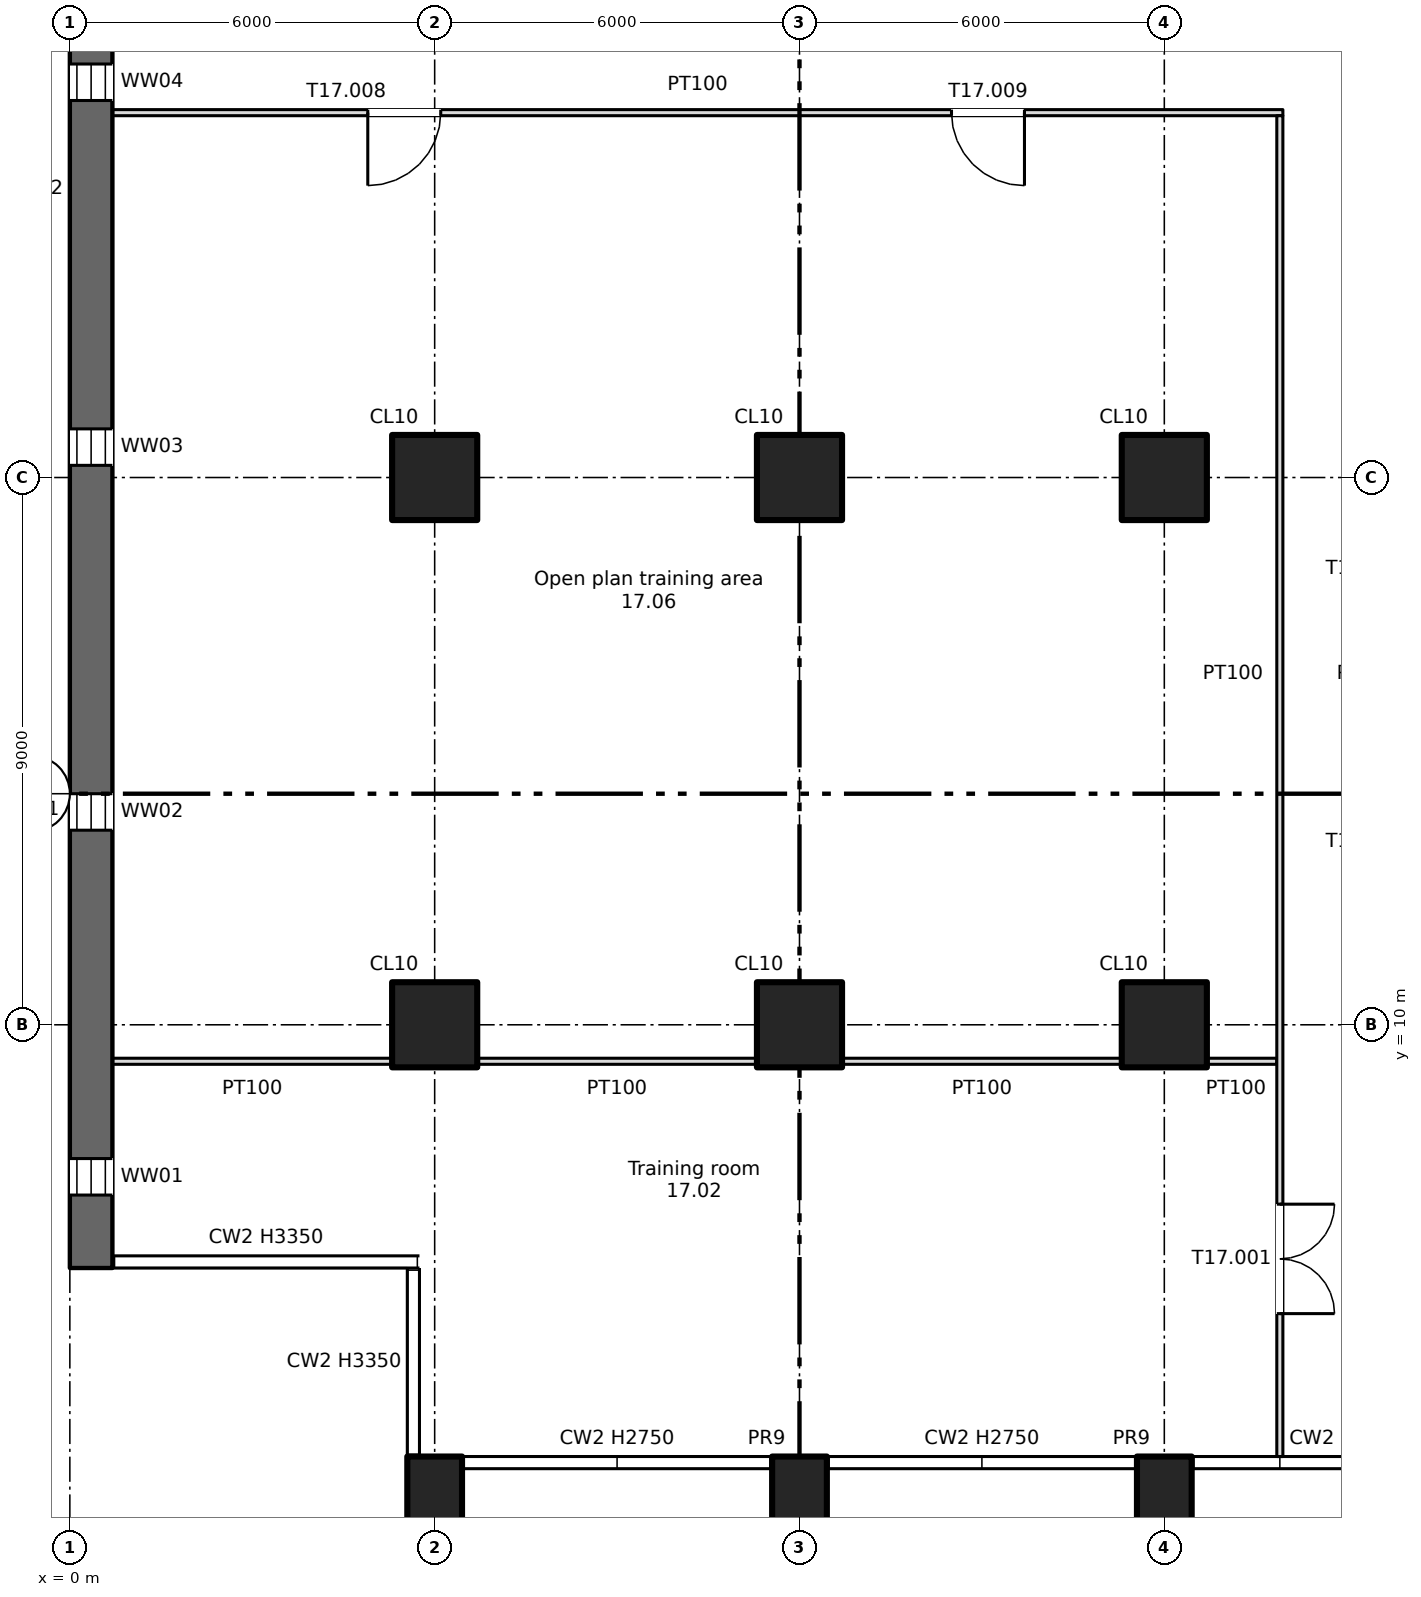
"""IFC4 building model, lengths in metres.
Left out: names, types, materials, properties, quantities, classifications, styles, units other than length and angle.
Written with IfcOpenShell. Run it as: python <this file> out.ifc"""

import sys

from ifc_helpers import new_model, si_unit, direction, frame, frame_2d, origin, origin_2d, place, context, subcontext, project, spatial, rectangle, extrude, element, fill, save


model = new_model("IFC4")
c1 = context("Model", 3, precision=1e-05, world=origin(), true_north=direction((0.0, 1.0)))
c2 = subcontext(c1, "Body", "Model", "MODEL_VIEW")
j1 = project(units=[si_unit("LENGTHUNIT", "METRE"), si_unit("PLANEANGLEUNIT", "RADIAN")], contexts=[c1])
p1 = place(None, origin())
s1 = spatial("IfcSite", under=j1, at=p1, CompositionType="ELEMENT")
p2 = place(p1, origin())
s2 = spatial("IfcBuilding", under=s1, at=p2, CompositionType="ELEMENT")
p3 = place(p2, frame((0.0, 0.0, 106.25)))
s3 = spatial("IfcBuildingStorey", under=s2, at=p3, CompositionType="ELEMENT", Elevation=106.25)
for number, where, z_axis, x_axis in (
    (1, (6.0, 2.2, -0.4), (0.0, 0.0, 1.0), (1.0, 0.0, 0.0)),
    (2, (12.0, 2.2, -0.4), (0.0, 0.0, 1.0), (1.0, 0.0, 0.0)),
    (3, (18.0, 2.2, -0.4), (0.0, 0.0, 1.0), (1.0, 0.0, 0.0)),
):
    element("IfcColumn", number, at=place(p3, frame(where, z_axis=z_axis, x_axis=x_axis)), inside=s3, PredefinedType="COLUMN", context=c2, shape_type="SweptSolid", body=[
        extrude(rectangle(XDim=0.9, YDim=1.4, at=origin_2d()), origin(), (0.0, 0.0, 1.0), 3.75),
    ])
for number, where, z_axis, x_axis in (
    (4, (6.0, 10.0, 0.0), (0.0, 0.0, 1.0), (1.0, 0.0, 0.0)),
    (5, (6.0, 19.0, 0.0), (0.0, 0.0, 1.0), (1.0, 0.0, 0.0)),
    (6, (12.0, 10.0, 0.0), (0.0, 0.0, 1.0), (1.0, 0.0, 0.0)),
    (7, (12.0, 19.0, 0.0), (0.0, 0.0, 1.0), (1.0, 0.0, 0.0)),
    (8, (18.0, 10.0, 0.0), (0.0, 0.0, 1.0), (1.0, 0.0, 0.0)),
    (9, (18.0, 19.0, 0.0), (0.0, 0.0, 1.0), (1.0, 0.0, 0.0)),
):
    element("IfcColumn", number, at=place(p3, frame(where, z_axis=z_axis, x_axis=x_axis)), inside=s3, PredefinedType="COLUMN", context=c2, shape_type="SweptSolid", body=[
        extrude(rectangle(XDim=1.4, YDim=1.4, at=origin_2d()), origin(), (0.0, 0.0, 1.0), 3.35),
    ])
p4 = place(p3, frame((0.35, 6.0, 0.0), z_axis=(0.0, 0.0, 1.0), x_axis=(0.0, 1.0, 0.0)))
e10 = element("IfcWall", 10, at=p4, inside=s3, PredefinedType="SHEAR", context=c2, shape_type="SweptSolid", body=[
    extrude(rectangle(XDim=35.5, YDim=0.7, at=frame_2d((17.75, 0.0))), origin(), (0.0, 0.0, 1.0), 3.35),
])
p5 = place(p4, frame((1.2, 0.0, 0.6)))
e11 = element("IfcOpeningElement", 11, at=p5, cuts=e10, PredefinedType="OPENING", context=c2, shape_type="SweptSolid", body=[
    extrude(rectangle(XDim=0.6, YDim=2.4, at=frame_2d((0.3, 1.2))), frame((0.0, 0.36, 0.0), z_axis=(0.0, -1.0, 0.0), x_axis=(1.0, 0.0, 0.0)), (0.0, 0.0, 1.0), 0.72),
])
p6 = place(p4, frame((7.2, 0.0, 0.6)))
e12 = element("IfcOpeningElement", 12, at=p6, cuts=e10, PredefinedType="OPENING", context=c2, shape_type="SweptSolid", body=[
    extrude(rectangle(XDim=0.6, YDim=2.4, at=frame_2d((0.3, 1.2))), frame((0.0, 0.36, 0.0), z_axis=(0.0, -1.0, 0.0), x_axis=(1.0, 0.0, 0.0)), (0.0, 0.0, 1.0), 0.72),
])
p7 = place(p4, frame((13.2, 0.0, 0.6)))
e13 = element("IfcOpeningElement", 13, at=p7, cuts=e10, PredefinedType="OPENING", context=c2, shape_type="SweptSolid", body=[
    extrude(rectangle(XDim=0.6, YDim=2.4, at=frame_2d((0.3, 1.2))), frame((0.0, 0.36, 0.0), z_axis=(0.0, -1.0, 0.0), x_axis=(1.0, 0.0, 0.0)), (0.0, 0.0, 1.0), 0.72),
])
p8 = place(p4, frame((19.2, 0.0, 0.6)))
e14 = element("IfcOpeningElement", 14, at=p8, cuts=e10, PredefinedType="OPENING", context=c2, shape_type="SweptSolid", body=[
    extrude(rectangle(XDim=0.6, YDim=2.4, at=frame_2d((0.3, 1.2))), frame((0.0, 0.36, 0.0), z_axis=(0.0, -1.0, 0.0), x_axis=(1.0, 0.0, 0.0)), (0.0, 0.0, 1.0), 0.72),
])
p9 = place(p4, frame((25.2, 0.0, 0.6)))
e15 = element("IfcOpeningElement", 15, at=p9, cuts=e10, PredefinedType="OPENING", context=c2, shape_type="SweptSolid", body=[
    extrude(rectangle(XDim=0.6, YDim=2.4, at=frame_2d((0.3, 1.2))), frame((0.0, 0.36, 0.0), z_axis=(0.0, -1.0, 0.0), x_axis=(1.0, 0.0, 0.0)), (0.0, 0.0, 1.0), 0.72),
])
p10 = place(p4, frame((31.2, 0.0, 0.6)))
e16 = element("IfcOpeningElement", 16, at=p10, cuts=e10, PredefinedType="OPENING", context=c2, shape_type="SweptSolid", body=[
    extrude(rectangle(XDim=0.6, YDim=2.4, at=frame_2d((0.3, 1.2))), frame((0.0, 0.36, 0.0), z_axis=(0.0, -1.0, 0.0), x_axis=(1.0, 0.0, 0.0)), (0.0, 0.0, 1.0), 0.72),
])
p11 = place(p3, frame((18.7, 9.4, 0.0), z_axis=(0.0, 0.0, 1.0), x_axis=(1.0, 0.0, 0.0)))
e17 = element("IfcWall", 17, at=p11, inside=s3, PredefinedType="PARTITIONING", context=c2, shape_type="SweptSolid", body=[
    extrude(rectangle(XDim=1.15, YDim=0.1, at=frame_2d((0.575, 0.0))), origin(), (0.0, 0.0, 1.0), 3.35),
])
for number, where, z_axis, x_axis in (
    (18, (12.7, 9.4, 0.0), (0.0, 0.0, 1.0), (1.0, 0.0, 0.0)),
    (19, (6.7, 9.4, 0.0), (0.0, 0.0, 1.0), (1.0, 0.0, 0.0)),
    (20, (0.7, 9.4, 0.0), (0.0, 0.0, 1.0), (1.0, 0.0, 0.0)),
):
    element("IfcWall", number, at=place(p3, frame(where, z_axis=z_axis, x_axis=x_axis)), inside=s3, PredefinedType="PARTITIONING", context=c2, shape_type="SweptSolid", body=[
        extrude(rectangle(XDim=4.6, YDim=0.1, at=frame_2d((2.3, 0.0))), origin(), (0.0, 0.0, 1.0), 3.35),
    ])
p12 = place(p3, frame((0.7, 25.0, 0.0), z_axis=(0.0, 0.0, 1.0), x_axis=(1.0, 0.0, 0.0)))
e21 = element("IfcWall", 21, at=p12, inside=s3, PredefinedType="PARTITIONING", context=c2, shape_type="SweptSolid", body=[
    extrude(rectangle(XDim=19.25, YDim=0.1, at=frame_2d((9.625, 0.0))), origin(), (0.0, 0.0, 1.0), 3.35),
])
p13 = place(p12, frame((4.2, 0.0, 0.0)))
e22 = element("IfcOpeningElement", 22, at=p13, cuts=e21, PredefinedType="OPENING", context=c2, shape_type="SweptSolid", body=[
    extrude(rectangle(XDim=1.2, YDim=2.1, at=frame_2d((0.6, 1.05))), frame((0.0, 0.06, 0.0), z_axis=(0.0, -1.0, 0.0), x_axis=(1.0, 0.0, 0.0)), (0.0, 0.0, 1.0), 0.12),
])
p14 = place(p12, frame((13.8, 0.0, 0.0)))
e23 = element("IfcOpeningElement", 23, at=p14, cuts=e21, PredefinedType="OPENING", context=c2, shape_type="SweptSolid", body=[
    extrude(rectangle(XDim=1.2, YDim=2.1, at=frame_2d((0.6, 1.05))), frame((0.0, 0.06, 0.0), z_axis=(0.0, -1.0, 0.0), x_axis=(1.0, 0.0, 0.0)), (0.0, 0.0, 1.0), 0.12),
])
p15 = place(p3, frame((19.9, 2.9, 0.0), z_axis=(0.0, 0.0, 1.0), x_axis=(0.0, 1.0, 0.0)))
e24 = element("IfcWall", 24, at=p15, inside=s3, PredefinedType="PARTITIONING", context=c2, shape_type="SweptSolid", body=[
    extrude(rectangle(XDim=22.05, YDim=0.1, at=frame_2d((11.025, 0.0))), origin(), (0.0, 0.0, 1.0), 3.35),
])
p16 = place(p15, frame((2.35, 0.0, 0.0)))
e25 = element("IfcOpeningElement", 25, at=p16, cuts=e24, PredefinedType="OPENING", context=c2, shape_type="SweptSolid", body=[
    extrude(rectangle(XDim=1.8, YDim=2.1, at=frame_2d((0.9, 1.05))), frame((0.0, 0.06, 0.0), z_axis=(0.0, -1.0, 0.0), x_axis=(1.0, 0.0, 0.0)), (0.0, 0.0, 1.0), 0.12),
])
p17 = place(p5, origin())
e26 = element("IfcWindow", 26, at=p17, inside=s3, PartitioningType="SINGLE_PANEL", PredefinedType="WINDOW", context=c2, shape_type="SweptSolid", body=[
    extrude(rectangle(XDim=0.6, YDim=2.4, at=frame_2d((0.3, 1.2))), frame((0.0, 0.03, 0.0), z_axis=(0.0, -1.0, 0.0), x_axis=(1.0, 0.0, 0.0)), (0.0, 0.0, 1.0), 0.06),
])
fill(e11, e26)
p18 = place(p6, origin())
e27 = element("IfcWindow", 27, at=p18, inside=s3, PartitioningType="SINGLE_PANEL", PredefinedType="WINDOW", context=c2, shape_type="SweptSolid", body=[
    extrude(rectangle(XDim=0.6, YDim=2.4, at=frame_2d((0.3, 1.2))), frame((0.0, 0.03, 0.0), z_axis=(0.0, -1.0, 0.0), x_axis=(1.0, 0.0, 0.0)), (0.0, 0.0, 1.0), 0.06),
])
fill(e12, e27)
p19 = place(p7, origin())
e28 = element("IfcWindow", 28, at=p19, inside=s3, PartitioningType="SINGLE_PANEL", PredefinedType="WINDOW", context=c2, shape_type="SweptSolid", body=[
    extrude(rectangle(XDim=0.6, YDim=2.4, at=frame_2d((0.3, 1.2))), frame((0.0, 0.03, 0.0), z_axis=(0.0, -1.0, 0.0), x_axis=(1.0, 0.0, 0.0)), (0.0, 0.0, 1.0), 0.06),
])
fill(e13, e28)
p20 = place(p8, origin())
e29 = element("IfcWindow", 29, at=p20, inside=s3, PartitioningType="SINGLE_PANEL", PredefinedType="WINDOW", context=c2, shape_type="SweptSolid", body=[
    extrude(rectangle(XDim=0.6, YDim=2.4, at=frame_2d((0.3, 1.2))), frame((0.0, 0.03, 0.0), z_axis=(0.0, -1.0, 0.0), x_axis=(1.0, 0.0, 0.0)), (0.0, 0.0, 1.0), 0.06),
])
fill(e14, e29)
p21 = place(p16, origin())
e30 = element("IfcDoor", 30, at=p21, inside=s3, OperationType="DOUBLE_DOOR_SINGLE_SWING", PredefinedType="DOOR", context=c2, shape_type="SweptSolid", body=[
    extrude(rectangle(XDim=1.8, YDim=2.1, at=frame_2d((0.9, 1.05))), frame((0.0, 0.025, 0.0), z_axis=(0.0, -1.0, 0.0), x_axis=(1.0, 0.0, 0.0)), (0.0, 0.0, 1.0), 0.05),
])
fill(e25, e30)
p22 = place(p13, origin())
e31 = element("IfcDoor", 31, at=p22, inside=s3, OperationType="SINGLE_SWING_LEFT", PredefinedType="DOOR", context=c2, shape_type="SweptSolid", body=[
    extrude(rectangle(XDim=1.2, YDim=2.1, at=frame_2d((0.6, 1.05))), frame((0.0, 0.025, 0.0), z_axis=(0.0, -1.0, 0.0), x_axis=(1.0, 0.0, 0.0)), (0.0, 0.0, 1.0), 0.05),
])
fill(e22, e31)
p23 = place(p14, origin())
e32 = element("IfcDoor", 32, at=p23, inside=s3, OperationType="SINGLE_SWING_RIGHT", PredefinedType="DOOR", context=c2, shape_type="SweptSolid", body=[
    extrude(rectangle(XDim=1.2, YDim=2.1, at=frame_2d((0.6, 1.05))), frame((0.0, 0.025, 0.0), z_axis=(0.0, -1.0, 0.0), x_axis=(1.0, 0.0, 0.0)), (0.0, 0.0, 1.0), 0.05),
])
fill(e23, e32)
save(model, sys.argv[1])
